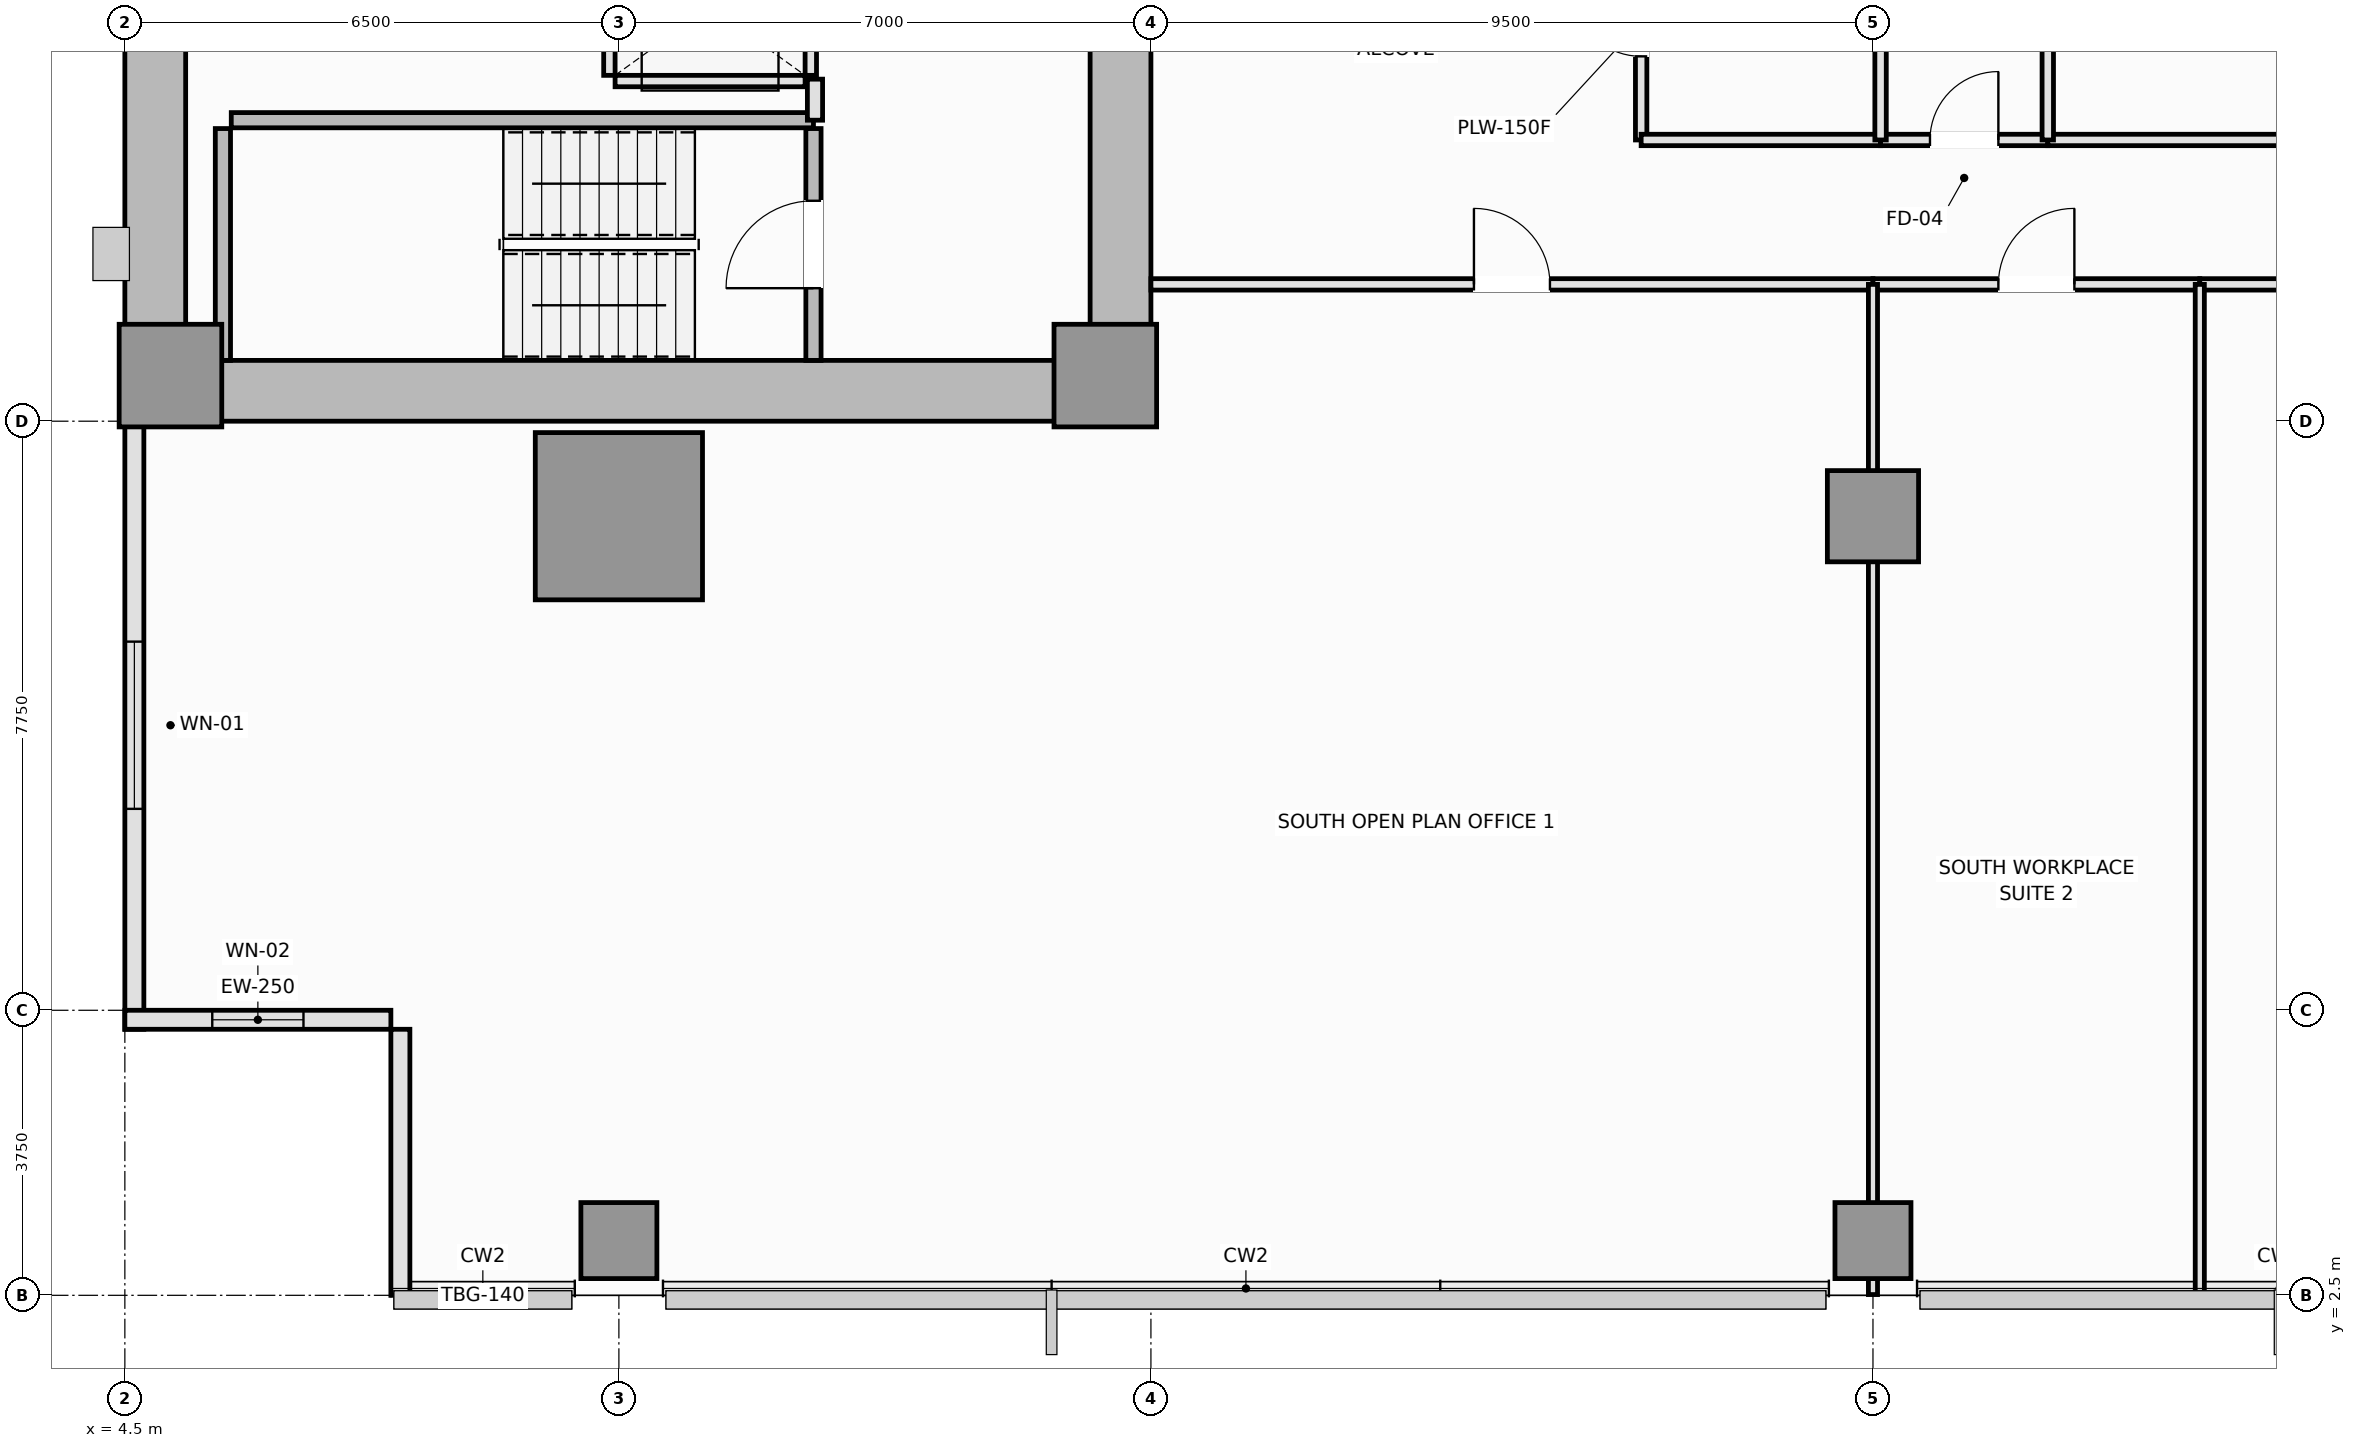
"""IFC4 building model, lengths in metres.
Left out: names, types, materials, properties, quantities, classifications, styles, units other than length and angle.
Written with IfcOpenShell. Run it as: python <this file> out.ifc"""

import sys

from ifc_helpers import new_model, si_unit, direction, frame, frame_2d, origin, origin_2d, place, context, subcontext, project, spatial, rectangle, extrude, element, fill, save


model = new_model("IFC4")
c1 = context("Model", 3, precision=1e-05, world=origin(), true_north=direction((0.0, 1.0)))
c2 = subcontext(c1, "Body", "Model", "MODEL_VIEW")
j1 = project(units=[si_unit("LENGTHUNIT", "METRE"), si_unit("PLANEANGLEUNIT", "RADIAN")], contexts=[c1])
p1 = place(None, origin())
s1 = spatial("IfcSite", under=j1, at=p1, CompositionType="ELEMENT")
p2 = place(p1, origin())
s2 = spatial("IfcBuilding", under=s1, at=p2, CompositionType="ELEMENT")
p3 = place(p2, frame((0.0, 0.0, 75.3)))
s3 = spatial("IfcBuildingStorey", under=s2, at=p3, CompositionType="ELEMENT", Elevation=75.3)
p4 = place(p3, frame((4.5, 14.4, 0.0), z_axis=(0.0, 0.0, 1.0), x_axis=(1.0, 0.0, 0.0)))
e1 = element("IfcWall", 1, at=p4, inside=s3, PredefinedType="SHEAR", context=c2, shape_type="SweptSolid", body=[
    extrude(rectangle(XDim=13.5, YDim=0.8, at=frame_2d((6.75, 0.0))), origin(), (0.0, 0.0, 1.0), 3.55),
])
p5 = place(p3, frame((4.9, 14.8, 0.0), z_axis=(0.0, 0.0, 1.0), x_axis=(0.0, 1.0, 0.0)))
e2 = element("IfcWall", 2, at=p5, inside=s3, PredefinedType="SHEAR", context=c2, shape_type="SweptSolid", body=[
    extrude(rectangle(XDim=20.9, YDim=0.8, at=frame_2d((10.45, 0.0))), origin(), (0.0, 0.0, 1.0), 3.55),
])
p6 = place(p3, frame((17.6, 14.8, 0.0), z_axis=(0.0, 0.0, 1.0), x_axis=(0.0, 1.0, 0.0)))
e3 = element("IfcWall", 3, at=p6, inside=s3, PredefinedType="SHEAR", context=c2, shape_type="SweptSolid", body=[
    extrude(rectangle(XDim=8.65, YDim=0.8, at=frame_2d((4.325, 0.0))), origin(), (0.0, 0.0, 1.0), 3.55),
])
p7 = place(p6, frame((4.1, 0.0, 0.0)))
e4 = element("IfcOpeningElement", 4, at=p7, cuts=e3, PredefinedType="OPENING", context=c2, shape_type="SweptSolid", body=[
    extrude(rectangle(XDim=1.1, YDim=2.15, at=frame_2d((0.55, 1.075))), frame((0.0, 0.41, 0.0), z_axis=(0.0, -1.0, 0.0), x_axis=(1.0, 0.0, 0.0)), (0.0, 0.0, 1.0), 0.82),
])
for number, where, z_axis, x_axis in (
    (5, (5.1, 14.6, 0.0), (0.0, 0.0, 1.0), (1.0, 0.0, 0.0)),
    (6, (17.4, 14.6, 0.0), (0.0, 0.0, 1.0), (1.0, 0.0, 0.0)),
):
    element("IfcColumn", number, at=place(p3, frame(where, z_axis=z_axis, x_axis=x_axis)), inside=s3, PredefinedType="PILASTER", context=c2, shape_type="SweptSolid", body=[
        extrude(rectangle(XDim=1.35, YDim=1.35, at=origin_2d()), origin(), (0.0, 0.0, 1.0), 3.55),
    ])
p8 = place(p3, frame((11.0, 12.75, 0.0), z_axis=(0.0, 0.0, 1.0), x_axis=(1.0, 0.0, 0.0)))
e7 = element("IfcColumn", 7, at=p8, inside=s3, PredefinedType="COLUMN", context=c2, shape_type="SweptSolid", body=[
    extrude(rectangle(XDim=2.2, YDim=2.2, at=origin_2d()), origin(), (0.0, 0.0, 1.0), 3.55),
])
p9 = place(p3, frame((27.5, 12.75, 0.0), z_axis=(0.0, 0.0, 1.0), x_axis=(1.0, 0.0, 0.0)))
e8 = element("IfcColumn", 8, at=p9, inside=s3, PredefinedType="COLUMN", context=c2, shape_type="SweptSolid", body=[
    extrude(rectangle(XDim=1.2, YDim=1.2, at=origin_2d()), origin(), (0.0, 0.0, 1.0), 3.55),
])
for number, where, z_axis, x_axis in (
    (9, (11.0, 3.22, 0.0), (0.0, 0.0, 1.0), (1.0, 0.0, 0.0)),
    (10, (27.5, 3.22, 0.0), (0.0, 0.0, 1.0), (1.0, 0.0, 0.0)),
):
    element("IfcColumn", number, at=place(p3, frame(where, z_axis=z_axis, x_axis=x_axis)), inside=s3, PredefinedType="COLUMN", context=c2, shape_type="SweptSolid", body=[
        extrude(rectangle(XDim=1.0, YDim=1.0, at=origin_2d()), origin(), (0.0, 0.0, 1.0), 3.55),
    ])
p10 = place(p3, frame((4.625, 14.0, 0.0), z_axis=(0.0, 0.0, 1.0), x_axis=(0.0, -1.0, 0.0)))
e11 = element("IfcWall", 11, at=p10, inside=s3, PredefinedType="SOLIDWALL", context=c2, shape_type="SweptSolid", body=[
    extrude(rectangle(XDim=8.0, YDim=0.25, at=frame_2d((4.0, 0.0))), origin(), (0.0, 0.0, 1.0), 3.37),
])
p11 = place(p10, frame((2.9, 0.0, 0.9)))
e12 = element("IfcOpeningElement", 12, at=p11, cuts=e11, PredefinedType="OPENING", context=c2, shape_type="SweptSolid", body=[
    extrude(rectangle(XDim=2.2, YDim=1.8, at=frame_2d((1.1, 0.9))), frame((0.0, 0.135, 0.0), z_axis=(0.0, -1.0, 0.0), x_axis=(1.0, 0.0, 0.0)), (0.0, 0.0, 1.0), 0.27),
])
p12 = place(p3, frame((4.5, 6.125, 0.0), z_axis=(0.0, 0.0, 1.0), x_axis=(1.0, 0.0, 0.0)))
e13 = element("IfcWall", 13, at=p12, inside=s3, PredefinedType="SOLIDWALL", context=c2, shape_type="SweptSolid", body=[
    extrude(rectangle(XDim=3.5, YDim=0.25, at=frame_2d((1.75, 0.0))), origin(), (0.0, 0.0, 1.0), 3.37),
])
p13 = place(p12, frame((1.15, 0.0, 0.9)))
e14 = element("IfcOpeningElement", 14, at=p13, cuts=e13, PredefinedType="OPENING", context=c2, shape_type="SweptSolid", body=[
    extrude(rectangle(XDim=1.2, YDim=1.8, at=frame_2d((0.6, 0.9))), frame((0.0, 0.135, 0.0), z_axis=(0.0, -1.0, 0.0), x_axis=(1.0, 0.0, 0.0)), (0.0, 0.0, 1.0), 0.27),
])
p14 = place(p3, frame((8.125, 6.0, 0.0), z_axis=(0.0, 0.0, 1.0), x_axis=(0.0, -1.0, 0.0)))
e15 = element("IfcWall", 15, at=p14, inside=s3, PredefinedType="SOLIDWALL", context=c2, shape_type="SweptSolid", body=[
    extrude(rectangle(XDim=3.5, YDim=0.25, at=frame_2d((1.75, 0.0))), origin(), (0.0, 0.0, 1.0), 3.37),
])
p15 = place(p3, frame((5.79, 14.8, 0.0), z_axis=(0.0, 0.0, 1.0), x_axis=(0.0, 1.0, 0.0)))
e16 = element("IfcWall", 16, at=p15, inside=s3, PredefinedType="SOLIDWALL", context=c2, shape_type="SweptSolid", body=[
    extrude(rectangle(XDim=3.05, YDim=0.2, at=frame_2d((1.525, 0.0))), origin(), (0.0, 0.0, 1.0), 3.55),
])
p16 = place(p3, frame((5.9, 17.96, 0.0), z_axis=(0.0, 0.0, 1.0), x_axis=(1.0, 0.0, 0.0)))
e17 = element("IfcWall", 17, at=p16, inside=s3, PredefinedType="SOLIDWALL", context=c2, shape_type="SweptSolid", body=[
    extrude(rectangle(XDim=7.66, YDim=0.2, at=frame_2d((3.83, 0.0))), origin(), (0.0, 0.0, 1.0), 3.55),
])
p17 = place(p3, frame((13.56, 14.8, 0.0), z_axis=(0.0, 0.0, 1.0), x_axis=(0.0, 1.0, 0.0)))
e18 = element("IfcWall", 18, at=p17, inside=s3, PredefinedType="SOLIDWALL", context=c2, shape_type="SweptSolid", body=[
    extrude(rectangle(XDim=3.05, YDim=0.2, at=frame_2d((1.525, 0.0))), origin(), (0.0, 0.0, 1.0), 3.55),
])
p18 = place(p17, frame((0.95, 0.0, 0.0)))
e19 = element("IfcOpeningElement", 19, at=p18, cuts=e18, PredefinedType="OPENING", context=c2, shape_type="SweptSolid", body=[
    extrude(rectangle(XDim=1.15, YDim=2.15, at=frame_2d((0.575, 1.075))), frame((0.0, 0.11, 0.0), z_axis=(0.0, -1.0, 0.0), x_axis=(1.0, 0.0, 0.0)), (0.0, 0.0, 1.0), 0.22),
])
p19 = place(p3, frame((10.95, 18.475, 0.0), z_axis=(0.0, 0.0, 1.0), x_axis=(1.0, 0.0, 0.0)))
e20 = element("IfcWall", 20, at=p19, inside=s3, PredefinedType="PARTITIONING", context=c2, shape_type="SweptSolid", body=[
    extrude(rectangle(XDim=2.5, YDim=0.15, at=frame_2d((1.25, 0.0))), origin(), (0.0, 0.0, 1.0), 3.37),
])
p20 = place(p3, frame((10.875, 18.55, 0.0), z_axis=(0.0, 0.0, 1.0), x_axis=(0.0, 1.0, 0.0)))
e21 = element("IfcWall", 21, at=p20, inside=s3, PredefinedType="PARTITIONING", context=c2, shape_type="SweptSolid", body=[
    extrude(rectangle(XDim=1.8, YDim=0.15, at=frame_2d((0.9, 0.0))), origin(), (0.0, 0.0, 1.0), 3.37),
])
p21 = place(p3, frame((13.525, 18.55, 0.0), z_axis=(0.0, 0.0, 1.0), x_axis=(0.0, 1.0, 0.0)))
e22 = element("IfcWall", 22, at=p21, inside=s3, PredefinedType="PARTITIONING", context=c2, shape_type="SweptSolid", body=[
    extrude(rectangle(XDim=1.8, YDim=0.15, at=frame_2d((0.9, 0.0))), origin(), (0.0, 0.0, 1.0), 3.37),
])
p22 = place(p21, frame((0.35, 0.0, 0.0)))
e23 = element("IfcOpeningElement", 23, at=p22, cuts=e22, PredefinedType="OPENING", context=c2, shape_type="SweptSolid", body=[
    extrude(rectangle(XDim=1.1, YDim=2.2, at=frame_2d((0.55, 1.1))), frame((0.0, 0.085, 0.0), z_axis=(0.0, -1.0, 0.0), x_axis=(1.0, 0.0, 0.0)), (0.0, 0.0, 1.0), 0.17),
])
p23 = place(p3, frame((13.58, 17.96, 0.0), z_axis=(0.0, 0.0, 1.0), x_axis=(0.0, 1.0, 0.0)))
e24 = element("IfcWall", 24, at=p23, inside=s3, PredefinedType="PARTITIONING", context=c2, shape_type="SweptSolid", body=[
    extrude(rectangle(XDim=0.54, YDim=0.2, at=frame_2d((0.27, 0.0))), origin(), (0.0, 0.0, 1.0), 3.37),
])
p24 = place(p3, frame((24.45, 17.7, 0.0), z_axis=(0.0, 0.0, 1.0), x_axis=(0.0, 1.0, 0.0)))
e25 = element("IfcWall", 25, at=p24, inside=s3, PredefinedType="PLUMBINGWALL", context=c2, shape_type="SweptSolid", body=[
    extrude(rectangle(XDim=3.1, YDim=0.15, at=frame_2d((1.55, 0.0))), origin(), (0.0, 0.0, 1.0), 3.37),
])
p25 = place(p24, frame((1.1, 0.0, 0.0)))
e26 = element("IfcOpeningElement", 26, at=p25, cuts=e25, PredefinedType="OPENING", context=c2, shape_type="SweptSolid", body=[
    extrude(rectangle(XDim=0.9, YDim=2.1, at=frame_2d((0.45, 1.05))), frame((0.0, 0.085, 0.0), z_axis=(0.0, -1.0, 0.0), x_axis=(1.0, 0.0, 0.0)), (0.0, 0.0, 1.0), 0.17),
])
p26 = place(p3, frame((24.45, 17.7, 0.0), z_axis=(0.0, 0.0, 1.0), x_axis=(1.0, 0.0, 0.0)))
e27 = element("IfcWall", 27, at=p26, inside=s3, PredefinedType="PLUMBINGWALL", context=c2, shape_type="SweptSolid", body=[
    extrude(rectangle(XDim=3.15, YDim=0.15, at=frame_2d((1.575, 0.0))), origin(), (0.0, 0.0, 1.0), 3.37),
])
p27 = place(p3, frame((27.6, 17.7, 0.0), z_axis=(0.0, 0.0, 1.0), x_axis=(1.0, 0.0, 0.0)))
e28 = element("IfcWall", 28, at=p27, inside=s3, PredefinedType="PLUMBINGWALL", context=c2, shape_type="SweptSolid", body=[
    extrude(rectangle(XDim=2.2, YDim=0.15, at=frame_2d((1.1, 0.0))), origin(), (0.0, 0.0, 1.0), 3.37),
])
p28 = place(p27, frame((0.65, 0.0, 0.0)))
e29 = element("IfcOpeningElement", 29, at=p28, cuts=e28, PredefinedType="OPENING", context=c2, shape_type="SweptSolid", body=[
    extrude(rectangle(XDim=0.9, YDim=2.1, at=frame_2d((0.45, 1.05))), frame((0.0, 0.085, 0.0), z_axis=(0.0, -1.0, 0.0), x_axis=(1.0, 0.0, 0.0)), (0.0, 0.0, 1.0), 0.17),
])
p29 = place(p3, frame((29.8, 17.7, 0.0), z_axis=(0.0, 0.0, 1.0), x_axis=(1.0, 0.0, 0.0)))
e30 = element("IfcWall", 30, at=p29, inside=s3, PredefinedType="PARTITIONING", context=c2, shape_type="SweptSolid", body=[
    extrude(rectangle(XDim=5.0, YDim=0.15, at=frame_2d((2.5, 0.0))), origin(), (0.0, 0.0, 1.0), 3.37),
])
p30 = place(p3, frame((18.0, 15.8, 0.0), z_axis=(0.0, 0.0, 1.0), x_axis=(1.0, 0.0, 0.0)))
e31 = element("IfcWall", 31, at=p30, inside=s3, PredefinedType="PARTITIONING", context=c2, shape_type="SweptSolid", body=[
    extrude(rectangle(XDim=9.5, YDim=0.15, at=frame_2d((4.75, 0.0))), origin(), (0.0, 0.0, 1.0), 3.37),
])
p31 = place(p30, frame((4.25, 0.0, 0.0)))
e32 = element("IfcOpeningElement", 32, at=p31, cuts=e31, PredefinedType="OPENING", context=c2, shape_type="SweptSolid", body=[
    extrude(rectangle(XDim=1.0, YDim=2.15, at=frame_2d((0.5, 1.075))), frame((0.0, 0.085, 0.0), z_axis=(0.0, -1.0, 0.0), x_axis=(1.0, 0.0, 0.0)), (0.0, 0.0, 1.0), 0.17),
])
p32 = place(p3, frame((27.5, 15.8, 0.0), z_axis=(0.0, 0.0, 1.0), x_axis=(1.0, 0.0, 0.0)))
e33 = element("IfcWall", 33, at=p32, inside=s3, PredefinedType="PARTITIONING", context=c2, shape_type="SweptSolid", body=[
    extrude(rectangle(XDim=4.3, YDim=0.15, at=frame_2d((2.15, 0.0))), origin(), (0.0, 0.0, 1.0), 3.37),
])
p33 = place(p32, frame((1.65, 0.0, 0.0)))
e34 = element("IfcOpeningElement", 34, at=p33, cuts=e33, PredefinedType="OPENING", context=c2, shape_type="SweptSolid", body=[
    extrude(rectangle(XDim=1.0, YDim=2.15, at=frame_2d((0.5, 1.075))), frame((0.0, 0.085, 0.0), z_axis=(0.0, -1.0, 0.0), x_axis=(1.0, 0.0, 0.0)), (0.0, 0.0, 1.0), 0.17),
])
p34 = place(p3, frame((31.8, 15.8, 0.0), z_axis=(0.0, 0.0, 1.0), x_axis=(1.0, 0.0, 0.0)))
e35 = element("IfcWall", 35, at=p34, inside=s3, PredefinedType="PARTITIONING", context=c2, shape_type="SweptSolid", body=[
    extrude(rectangle(XDim=4.9, YDim=0.15, at=frame_2d((2.45, 0.0))), origin(), (0.0, 0.0, 1.0), 3.37),
])
p35 = place(p34, frame((1.95, 0.0, 0.0)))
e36 = element("IfcOpeningElement", 36, at=p35, cuts=e35, PredefinedType="OPENING", context=c2, shape_type="SweptSolid", body=[
    extrude(rectangle(XDim=1.0, YDim=2.15, at=frame_2d((0.5, 1.075))), frame((0.0, 0.085, 0.0), z_axis=(0.0, -1.0, 0.0), x_axis=(1.0, 0.0, 0.0)), (0.0, 0.0, 1.0), 0.17),
])
for number, where, z_axis, x_axis in (
    (37, (27.6, 17.7, 0.0), (0.0, 0.0, 1.0), (0.0, 1.0, 0.0)),
    (38, (29.8, 17.7, 0.0), (0.0, 0.0, 1.0), (0.0, 1.0, 0.0)),
):
    element("IfcWall", number, at=place(p3, frame(where, z_axis=z_axis, x_axis=x_axis)), inside=s3, PredefinedType="PLUMBINGWALL", context=c2, shape_type="SweptSolid", body=[
        extrude(rectangle(XDim=3.1, YDim=0.15, at=frame_2d((1.55, 0.0))), origin(), (0.0, 0.0, 1.0), 3.37),
    ])
p36 = place(p3, frame((27.5, 2.51, 0.0), z_axis=(0.0, 0.0, 1.0), x_axis=(0.0, 1.0, 0.0)))
e39 = element("IfcWall", 39, at=p36, inside=s3, PredefinedType="PARTITIONING", context=c2, shape_type="SweptSolid", body=[
    extrude(rectangle(XDim=13.29, YDim=0.12, at=frame_2d((6.645, 0.0))), origin(), (0.0, 0.0, 1.0), 2.82),
])
p37 = place(p3, frame((31.8, 2.51, 0.0), z_axis=(0.0, 0.0, 1.0), x_axis=(0.0, 1.0, 0.0)))
e40 = element("IfcWall", 40, at=p37, inside=s3, PredefinedType="PARTITIONING", context=c2, shape_type="SweptSolid", body=[
    extrude(rectangle(XDim=13.29, YDim=0.12, at=frame_2d((6.645, 0.0))), origin(), (0.0, 0.0, 1.0), 3.37),
])
p38 = place(p11, origin())
e41 = element("IfcWindow", 41, at=p38, inside=s3, PartitioningType="SINGLE_PANEL", PredefinedType="WINDOW", context=c2, shape_type="SweptSolid", body=[
    extrude(rectangle(XDim=2.2, YDim=1.8, at=frame_2d((1.1, 0.9))), frame((0.0, 0.03, 0.0), z_axis=(0.0, -1.0, 0.0), x_axis=(1.0, 0.0, 0.0)), (0.0, 0.0, 1.0), 0.06),
])
fill(e12, e41)
p39 = place(p13, origin())
e42 = element("IfcWindow", 42, at=p39, inside=s3, PartitioningType="SINGLE_PANEL", PredefinedType="WINDOW", context=c2, shape_type="SweptSolid", body=[
    extrude(rectangle(XDim=1.2, YDim=1.8, at=frame_2d((0.6, 0.9))), frame((0.0, 0.03, 0.0), z_axis=(0.0, -1.0, 0.0), x_axis=(1.0, 0.0, 0.0)), (0.0, 0.0, 1.0), 0.06),
])
fill(e14, e42)
p40 = place(p18, origin())
e43 = element("IfcDoor", 43, at=p40, inside=s3, OperationType="SINGLE_SWING_LEFT", PredefinedType="DOOR", context=c2, shape_type="SweptSolid", body=[
    extrude(rectangle(XDim=1.15, YDim=2.15, at=frame_2d((0.575, 1.075))), frame((0.0, 0.025, 0.0), z_axis=(0.0, -1.0, 0.0), x_axis=(1.0, 0.0, 0.0)), (0.0, 0.0, 1.0), 0.05),
])
fill(e19, e43)
p41 = place(p25, origin())
e44 = element("IfcDoor", 44, at=p41, inside=s3, OperationType="SINGLE_SWING_RIGHT", PredefinedType="DOOR", context=c2, shape_type="SweptSolid", body=[
    extrude(rectangle(XDim=0.9, YDim=2.1, at=frame_2d((0.45, 1.05))), frame((0.0, 0.025, 0.0), z_axis=(0.0, -1.0, 0.0), x_axis=(1.0, 0.0, 0.0)), (0.0, 0.0, 1.0), 0.05),
])
fill(e26, e44)
p42 = place(p28, origin())
e45 = element("IfcDoor", 45, at=p42, inside=s3, OperationType="SINGLE_SWING_RIGHT", PredefinedType="DOOR", context=c2, shape_type="SweptSolid", body=[
    extrude(rectangle(XDim=0.9, YDim=2.1, at=frame_2d((0.45, 1.05))), frame((0.0, 0.025, 0.0), z_axis=(0.0, -1.0, 0.0), x_axis=(1.0, 0.0, 0.0)), (0.0, 0.0, 1.0), 0.05),
])
fill(e29, e45)
p43 = place(p31, origin())
e46 = element("IfcDoor", 46, at=p43, inside=s3, OperationType="SINGLE_SWING_LEFT", PredefinedType="DOOR", context=c2, shape_type="SweptSolid", body=[
    extrude(rectangle(XDim=1.0, YDim=2.15, at=frame_2d((0.5, 1.075))), frame((0.0, 0.025, 0.0), z_axis=(0.0, -1.0, 0.0), x_axis=(1.0, 0.0, 0.0)), (0.0, 0.0, 1.0), 0.05),
])
fill(e32, e46)
p44 = place(p33, origin())
e47 = element("IfcDoor", 47, at=p44, inside=s3, OperationType="SINGLE_SWING_RIGHT", PredefinedType="DOOR", context=c2, shape_type="SweptSolid", body=[
    extrude(rectangle(XDim=1.0, YDim=2.15, at=frame_2d((0.5, 1.075))), frame((0.0, 0.025, 0.0), z_axis=(0.0, -1.0, 0.0), x_axis=(1.0, 0.0, 0.0)), (0.0, 0.0, 1.0), 0.05),
])
fill(e34, e47)
save(model, sys.argv[1])
